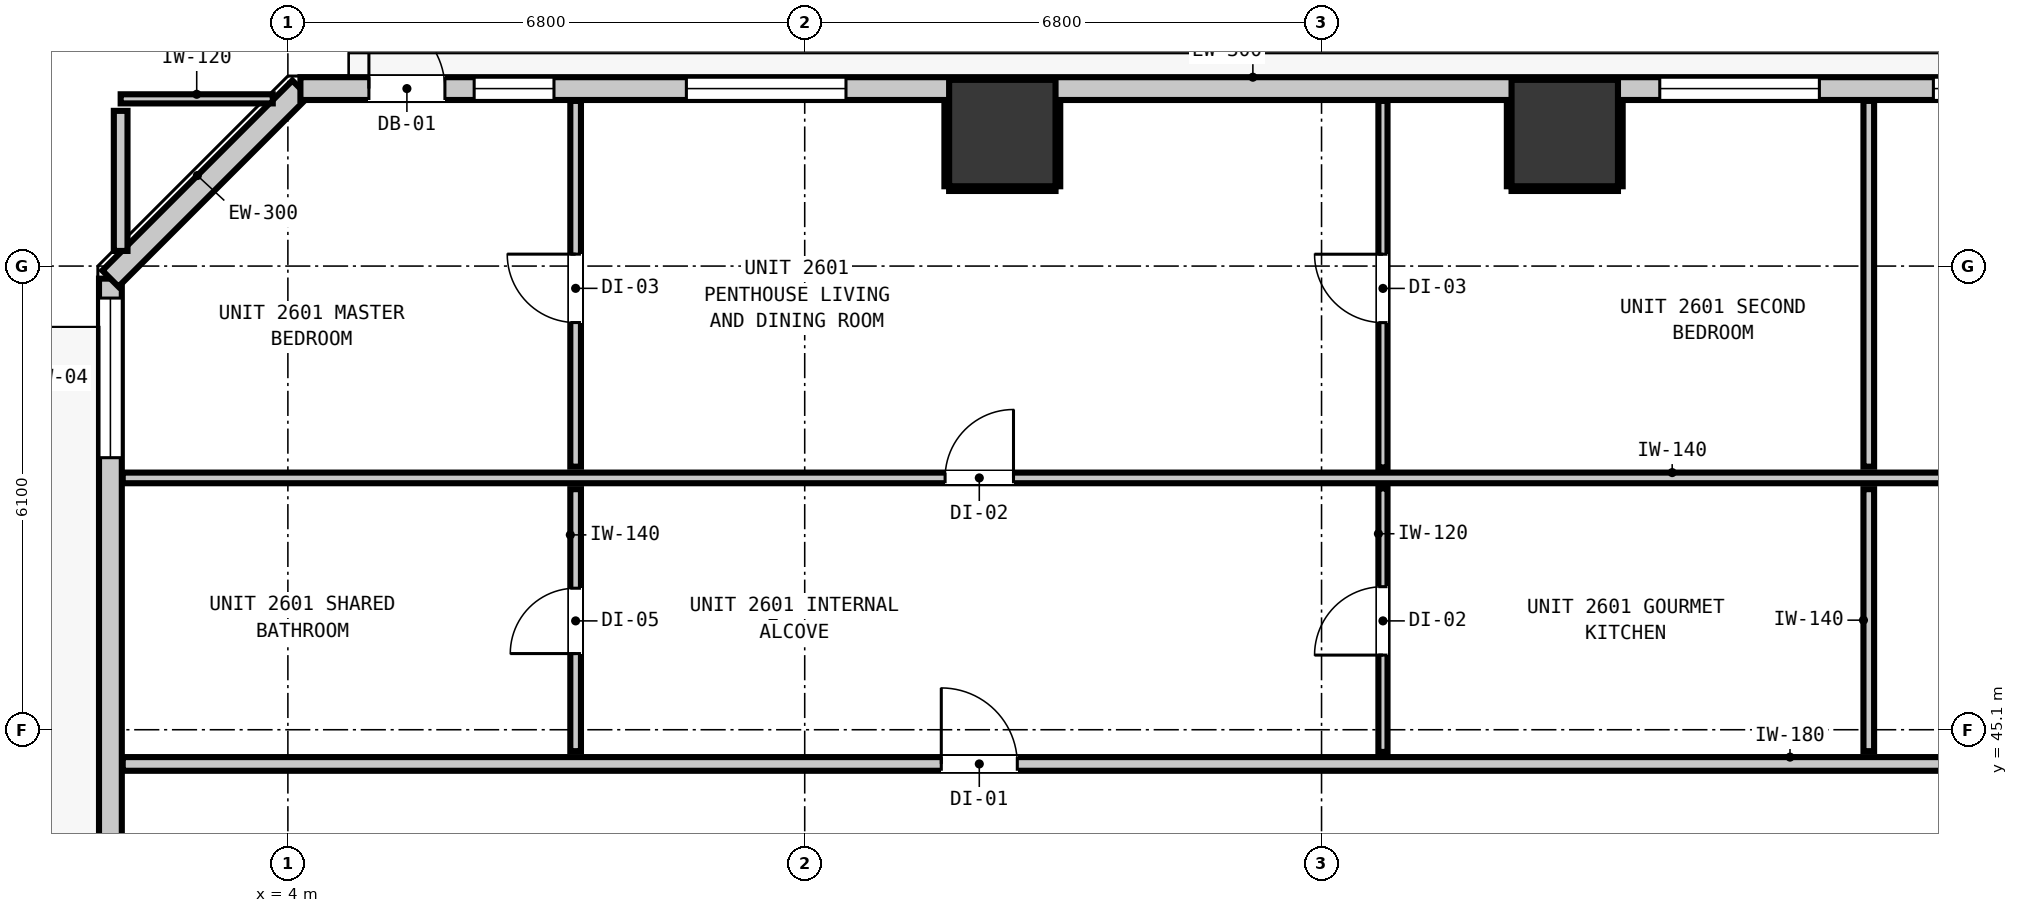
"""IFC4 building model, lengths in metres.
Left out: names, types, materials, properties, quantities, classifications, styles, units other than length and angle.
Written with IfcOpenShell. Run it as: python <this file> out.ifc"""

import sys

from ifc_helpers import new_model, si_unit, direction, frame, frame_2d, origin, origin_2d, place, context, subcontext, project, spatial, rectangle, extrude, element, fill, save


model = new_model("IFC4")
c1 = context("Model", 3, precision=1e-05, world=origin(), true_north=direction((0.0, 1.0)))
c2 = subcontext(c1, "Body", "Model", "MODEL_VIEW")
j1 = project(units=[si_unit("LENGTHUNIT", "METRE"), si_unit("PLANEANGLEUNIT", "RADIAN")], contexts=[c1])
p1 = place(None, origin())
s1 = spatial("IfcSite", under=j1, at=p1, CompositionType="ELEMENT")
p2 = place(p1, origin())
s2 = spatial("IfcBuilding", under=s1, at=p2, CompositionType="ELEMENT")
p3 = place(p2, frame((0.0, 0.0, 92.8)))
s3 = spatial("IfcBuildingStorey", under=s2, at=p3, CompositionType="ELEMENT", Elevation=92.8)
for number, where, z_axis, x_axis in (
    (1, (13.4, 52.95, 0.0), (0.0, 0.0, 1.0), (1.0, 0.0, 0.0)),
    (2, (20.8, 52.95, 0.0), (0.0, 0.0, 1.0), (1.0, 0.0, 0.0)),
):
    element("IfcColumn", number, at=place(p3, frame(where, z_axis=z_axis, x_axis=x_axis)), inside=s3, PredefinedType="COLUMN", context=c2, shape_type="SweptSolid", body=[
        extrude(rectangle(XDim=1.4, YDim=1.4, at=origin_2d()), origin(), (0.0, 0.0, 1.0), 3.32),
    ])
p4 = place(p3, frame((1.665, 16.365, 0.0), z_axis=(0.0, 0.0, 1.0), x_axis=(0.0, 1.0, 0.0)))
e3 = element("IfcWall", 3, at=p4, inside=s3, PredefinedType="STANDARD", context=c2, shape_type="SweptSolid", body=[
    extrude(rectangle(XDim=34.67, YDim=0.3, at=frame_2d((17.335, 0.0))), origin(), (0.0, 0.0, 1.0), 3.06),
])
p5 = place(p4, frame((0.901, 0.0, 0.0)))
e4 = element("IfcOpeningElement", 4, at=p5, cuts=e3, PredefinedType="OPENING", context=c2, shape_type="SweptSolid", body=[
    extrude(rectangle(XDim=1.0, YDim=2.15, at=frame_2d((0.5, 1.075))), frame((0.0, 0.16, 0.0), z_axis=(0.0, -1.0, 0.0), x_axis=(1.0, 0.0, 0.0)), (0.0, 0.0, 1.0), 0.32),
])
p6 = place(p4, frame((32.314, 0.0, 0.85)))
e5 = element("IfcOpeningElement", 5, at=p6, cuts=e3, PredefinedType="OPENING", context=c2, shape_type="SweptSolid", body=[
    extrude(rectangle(XDim=2.1, YDim=1.9, at=frame_2d((1.05, 0.95))), frame((0.0, 0.16, 0.0), z_axis=(0.0, -1.0, 0.0), x_axis=(1.0, 0.0, 0.0)), (0.0, 0.0, 1.0), 0.32),
])
p7 = place(p3, frame((1.665, 51.035, 0.0), z_axis=(0.0, 0.0, 1.0), x_axis=(0.707106781187, 0.707106781187, 0.0)))
e6 = element("IfcWall", 6, at=p7, inside=s3, PredefinedType="STANDARD", context=c2, shape_type="SweptSolid", body=[
    extrude(rectangle(XDim=3.536, YDim=0.3, at=frame_2d((1.768, 0.0))), origin(), (0.0, 0.0, 1.0), 3.06),
])
p8 = place(p3, frame((4.165, 53.535, 0.0), z_axis=(0.0, 0.0, 1.0), x_axis=(1.0, 0.0, 0.0)))
e7 = element("IfcWall", 7, at=p8, inside=s3, PredefinedType="STANDARD", context=c2, shape_type="SweptSolid", body=[
    extrude(rectangle(XDim=37.47, YDim=0.3, at=frame_2d((18.735, 0.0))), origin(), (0.0, 0.0, 1.0), 3.06),
])
p9 = place(p8, frame((0.901, 0.0, 0.0)))
e8 = element("IfcOpeningElement", 8, at=p9, cuts=e7, PredefinedType="OPENING", context=c2, shape_type="SweptSolid", body=[
    extrude(rectangle(XDim=1.0, YDim=2.15, at=frame_2d((0.5, 1.075))), frame((0.0, 0.16, 0.0), z_axis=(0.0, -1.0, 0.0), x_axis=(1.0, 0.0, 0.0)), (0.0, 0.0, 1.0), 0.32),
])
p10 = place(p8, frame((5.078, 0.0, 0.85)))
e9 = element("IfcOpeningElement", 9, at=p10, cuts=e7, PredefinedType="OPENING", context=c2, shape_type="SweptSolid", body=[
    extrude(rectangle(XDim=2.1, YDim=1.9, at=frame_2d((1.05, 0.95))), frame((0.0, 0.16, 0.0), z_axis=(0.0, -1.0, 0.0), x_axis=(1.0, 0.0, 0.0)), (0.0, 0.0, 1.0), 0.32),
])
p11 = place(p8, frame((2.286, 0.0, 0.85)))
e10 = element("IfcOpeningElement", 10, at=p11, cuts=e7, PredefinedType="OPENING", context=c2, shape_type="SweptSolid", body=[
    extrude(rectangle(XDim=1.05, YDim=1.65, at=frame_2d((0.525, 0.825))), frame((0.0, 0.16, 0.0), z_axis=(0.0, -1.0, 0.0), x_axis=(1.0, 0.0, 0.0)), (0.0, 0.0, 1.0), 0.32),
])
p12 = place(p8, frame((17.885, 0.0, 0.85)))
e11 = element("IfcOpeningElement", 11, at=p12, cuts=e7, PredefinedType="OPENING", context=c2, shape_type="SweptSolid", body=[
    extrude(rectangle(XDim=2.1, YDim=1.9, at=frame_2d((1.05, 0.95))), frame((0.0, 0.16, 0.0), z_axis=(0.0, -1.0, 0.0), x_axis=(1.0, 0.0, 0.0)), (0.0, 0.0, 1.0), 0.32),
])
p13 = place(p8, frame((28.125, 0.0, 0.85)))
e12 = element("IfcOpeningElement", 12, at=p13, cuts=e7, PredefinedType="OPENING", context=c2, shape_type="SweptSolid", body=[
    extrude(rectangle(XDim=2.1, YDim=1.9, at=frame_2d((1.05, 0.95))), frame((0.0, 0.16, 0.0), z_axis=(0.0, -1.0, 0.0), x_axis=(1.0, 0.0, 0.0)), (0.0, 0.0, 1.0), 0.32),
])
p14 = place(p8, frame((21.485, 0.0, 0.85)))
e13 = element("IfcOpeningElement", 13, at=p14, cuts=e7, PredefinedType="OPENING", context=c2, shape_type="SweptSolid", body=[
    extrude(rectangle(XDim=2.1, YDim=1.9, at=frame_2d((1.05, 0.95))), frame((0.0, 0.16, 0.0), z_axis=(0.0, -1.0, 0.0), x_axis=(1.0, 0.0, 0.0)), (0.0, 0.0, 1.0), 0.32),
])
p15 = place(p8, frame((34.648, 0.0, 0.85)))
e14 = element("IfcOpeningElement", 14, at=p15, cuts=e7, PredefinedType="OPENING", context=c2, shape_type="SweptSolid", body=[
    extrude(rectangle(XDim=2.1, YDim=1.9, at=frame_2d((1.05, 0.95))), frame((0.0, 0.16, 0.0), z_axis=(0.0, -1.0, 0.0), x_axis=(1.0, 0.0, 0.0)), (0.0, 0.0, 1.0), 0.32),
])
p16 = place(p3, frame((1.827, 44.65, 0.0), z_axis=(0.0, 0.0, 1.0), x_axis=(1.0, 0.0, 0.0)))
e15 = element("IfcWall", 15, at=p16, inside=s3, PredefinedType="PARTITIONING", context=c2, shape_type="SweptSolid", body=[
    extrude(rectangle(XDim=42.146, YDim=0.18, at=frame_2d((21.073, 0.0))), origin(), (0.0, 0.0, 1.0), 3.06),
])
p17 = place(p16, frame((10.77, 0.0, 0.0)))
e16 = element("IfcOpeningElement", 16, at=p17, cuts=e15, PredefinedType="OPENING", context=c2, shape_type="SweptSolid", body=[
    extrude(rectangle(XDim=1.0, YDim=2.15, at=frame_2d((0.5, 1.075))), frame((0.0, 0.1, 0.0), z_axis=(0.0, -1.0, 0.0), x_axis=(1.0, 0.0, 0.0)), (0.0, 0.0, 1.0), 0.2),
])
p18 = place(p16, frame((32.103, 0.0, 0.0)))
e17 = element("IfcOpeningElement", 17, at=p18, cuts=e15, PredefinedType="OPENING", context=c2, shape_type="SweptSolid", body=[
    extrude(rectangle(XDim=1.0, YDim=2.15, at=frame_2d((0.5, 1.075))), frame((0.0, 0.1, 0.0), z_axis=(0.0, -1.0, 0.0), x_axis=(1.0, 0.0, 0.0)), (0.0, 0.0, 1.0), 0.2),
])
p19 = place(p3, frame((1.827, 48.413, 0.0), z_axis=(0.0, 0.0, 1.0), x_axis=(1.0, 0.0, 0.0)))
e18 = element("IfcWall", 18, at=p19, inside=s3, PredefinedType="PARTITIONING", context=c2, shape_type="SweptSolid", body=[
    extrude(rectangle(XDim=28.953, YDim=0.14, at=frame_2d((14.477, 0.0))), origin(), (0.0, 0.0, 1.0), 3.06),
])
p20 = place(p19, frame((10.82, 0.0, 0.0)))
e19 = element("IfcOpeningElement", 19, at=p20, cuts=e18, PredefinedType="OPENING", context=c2, shape_type="SweptSolid", body=[
    extrude(rectangle(XDim=0.9, YDim=2.1, at=frame_2d((0.45, 1.05))), frame((0.0, 0.08, 0.0), z_axis=(0.0, -1.0, 0.0), x_axis=(1.0, 0.0, 0.0)), (0.0, 0.0, 1.0), 0.16),
])
p21 = place(p3, frame((1.8, 53.4, 0.0), z_axis=(0.0, 0.0, 1.0), x_axis=(1.0, 0.0, 0.0)))
e20 = element("IfcWall", 20, at=p21, inside=s3, PredefinedType="PARTITIONING", context=c2, shape_type="SweptSolid", body=[
    extrude(rectangle(XDim=2.001, YDim=0.12, at=frame_2d((1.0, 0.0))), origin(), (0.0, 0.0, 1.0), 3.06),
])
p22 = place(p3, frame((1.8, 51.399, 0.0), z_axis=(0.0, 0.0, 1.0), x_axis=(0.0, 1.0, 0.0)))
e21 = element("IfcWall", 21, at=p22, inside=s3, PredefinedType="PARTITIONING", context=c2, shape_type="SweptSolid", body=[
    extrude(rectangle(XDim=1.843, YDim=0.18, at=frame_2d((0.921, 0.0))), origin(), (0.0, 0.0, 1.0), 3.06),
])
p23 = place(p3, frame((7.786, 44.818, 0.0), z_axis=(0.0, 0.0, 1.0), x_axis=(0.0, 1.0, 0.0)))
e22 = element("IfcWall", 22, at=p23, inside=s3, PredefinedType="PARTITIONING", context=c2, shape_type="SweptSolid", body=[
    extrude(rectangle(XDim=3.447, YDim=0.14, at=frame_2d((1.723, 0.0))), origin(), (0.0, 0.0, 1.0), 3.06),
])
p24 = place(p23, frame((1.284, 0.0, 0.0)))
e23 = element("IfcOpeningElement", 23, at=p24, cuts=e22, PredefinedType="OPENING", context=c2, shape_type="SweptSolid", body=[
    extrude(rectangle(XDim=0.86, YDim=2.02, at=frame_2d((0.43, 1.01))), frame((0.0, 0.08, 0.0), z_axis=(0.0, -1.0, 0.0), x_axis=(1.0, 0.0, 0.0)), (0.0, 0.0, 1.0), 0.16),
])
p25 = place(p3, frame((7.786, 48.561, 0.0), z_axis=(0.0, 0.0, 1.0), x_axis=(0.0, 1.0, 0.0)))
e24 = element("IfcWall", 24, at=p25, inside=s3, PredefinedType="PARTITIONING", context=c2, shape_type="SweptSolid", body=[
    extrude(rectangle(XDim=4.812, YDim=0.14, at=frame_2d((2.406, 0.0))), origin(), (0.0, 0.0, 1.0), 3.06),
])
p26 = place(p25, frame((1.896, 0.0, 0.0)))
e25 = element("IfcOpeningElement", 25, at=p26, cuts=e24, PredefinedType="OPENING", context=c2, shape_type="SweptSolid", body=[
    extrude(rectangle(XDim=0.9, YDim=2.1, at=frame_2d((0.45, 1.05))), frame((0.0, 0.08, 0.0), z_axis=(0.0, -1.0, 0.0), x_axis=(1.0, 0.0, 0.0)), (0.0, 0.0, 1.0), 0.16),
])
p27 = place(p3, frame((24.8, 44.818, 0.0), z_axis=(0.0, 0.0, 1.0), x_axis=(0.0, 1.0, 0.0)))
e26 = element("IfcWall", 26, at=p27, inside=s3, PredefinedType="PARTITIONING", context=c2, shape_type="SweptSolid", body=[
    extrude(rectangle(XDim=3.447, YDim=0.14, at=frame_2d((1.723, 0.0))), origin(), (0.0, 0.0, 1.0), 3.06),
])
p28 = place(p3, frame((24.8, 48.561, 0.0), z_axis=(0.0, 0.0, 1.0), x_axis=(0.0, 1.0, 0.0)))
e27 = element("IfcWall", 27, at=p28, inside=s3, PredefinedType="PARTITIONING", context=c2, shape_type="SweptSolid", body=[
    extrude(rectangle(XDim=4.812, YDim=0.14, at=frame_2d((2.406, 0.0))), origin(), (0.0, 0.0, 1.0), 3.06),
])
p29 = place(p3, frame((18.408, 44.808, 0.0), z_axis=(0.0, 0.0, 1.0), x_axis=(0.0, 1.0, 0.0)))
e28 = element("IfcWall", 28, at=p29, inside=s3, PredefinedType="PARTITIONING", context=c2, shape_type="SweptSolid", body=[
    extrude(rectangle(XDim=3.467, YDim=0.12, at=frame_2d((1.733, 0.0))), origin(), (0.0, 0.0, 1.0), 3.06),
])
p30 = place(p29, frame((1.274, 0.0, 0.0)))
e29 = element("IfcOpeningElement", 29, at=p30, cuts=e28, PredefinedType="OPENING", context=c2, shape_type="SweptSolid", body=[
    extrude(rectangle(XDim=0.9, YDim=2.1, at=frame_2d((0.45, 1.05))), frame((0.0, 0.07, 0.0), z_axis=(0.0, -1.0, 0.0), x_axis=(1.0, 0.0, 0.0)), (0.0, 0.0, 1.0), 0.14),
])
p31 = place(p3, frame((18.408, 48.551, 0.0), z_axis=(0.0, 0.0, 1.0), x_axis=(0.0, 1.0, 0.0)))
e30 = element("IfcWall", 30, at=p31, inside=s3, PredefinedType="PARTITIONING", context=c2, shape_type="SweptSolid", body=[
    extrude(rectangle(XDim=4.822, YDim=0.12, at=frame_2d((2.411, 0.0))), origin(), (0.0, 0.0, 1.0), 3.06),
])
p32 = place(p31, frame((1.905, 0.0, 0.0)))
e31 = element("IfcOpeningElement", 31, at=p32, cuts=e30, PredefinedType="OPENING", context=c2, shape_type="SweptSolid", body=[
    extrude(rectangle(XDim=0.9, YDim=2.1, at=frame_2d((0.45, 1.05))), frame((0.0, 0.07, 0.0), z_axis=(0.0, -1.0, 0.0), x_axis=(1.0, 0.0, 0.0)), (0.0, 0.0, 1.0), 0.14),
])
p33 = place(p3, frame((12.7, 52.218, 0.0), z_axis=(0.0, 0.0, 1.0), x_axis=(1.0, 0.0, 0.0)))
e32 = element("IfcWall", 32, at=p33, inside=s3, PredefinedType="PARTITIONING", context=c2, shape_type="SweptSolid", body=[
    extrude(rectangle(XDim=1.4, YDim=0.06, at=frame_2d((0.7, 0.0))), origin(), (0.0, 0.0, 1.0), 1.45),
])
for number, where, z_axis, x_axis in (
    (33, (12.668, 52.25, 0.0), (0.0, 0.0, 1.0), (0.0, 1.0, 0.0)),
    (34, (14.132, 52.25, 0.0), (0.0, 0.0, 1.0), (0.0, 1.0, 0.0)),
):
    element("IfcWall", number, at=place(p3, frame(where, z_axis=z_axis, x_axis=x_axis)), inside=s3, PredefinedType="PARTITIONING", context=c2, shape_type="SweptSolid", body=[
        extrude(rectangle(XDim=1.12, YDim=0.06, at=frame_2d((0.56, 0.0))), origin(), (0.0, 0.0, 1.0), 1.45),
    ])
p34 = place(p3, frame((20.1, 52.218, 0.0), z_axis=(0.0, 0.0, 1.0), x_axis=(1.0, 0.0, 0.0)))
e35 = element("IfcWall", 35, at=p34, inside=s3, PredefinedType="PARTITIONING", context=c2, shape_type="SweptSolid", body=[
    extrude(rectangle(XDim=1.4, YDim=0.06, at=frame_2d((0.7, 0.0))), origin(), (0.0, 0.0, 1.0), 1.45),
])
for number, where, z_axis, x_axis in (
    (36, (20.068, 52.25, 0.0), (0.0, 0.0, 1.0), (0.0, 1.0, 0.0)),
    (37, (21.532, 52.25, 0.0), (0.0, 0.0, 1.0), (0.0, 1.0, 0.0)),
):
    element("IfcWall", number, at=place(p3, frame(where, z_axis=z_axis, x_axis=x_axis)), inside=s3, PredefinedType="PARTITIONING", context=c2, shape_type="SweptSolid", body=[
        extrude(rectangle(XDim=1.12, YDim=0.06, at=frame_2d((0.56, 0.0))), origin(), (0.0, 0.0, 1.0), 1.45),
    ])
p35 = place(p9, origin())
e38 = element("IfcDoor", 38, at=p35, inside=s3, OperationType="SINGLE_SWING_LEFT", PredefinedType="DOOR", context=c2, shape_type="SweptSolid", body=[
    extrude(rectangle(XDim=1.0, YDim=2.15, at=frame_2d((0.5, 1.075))), frame((0.0, 0.025, 0.0), z_axis=(0.0, -1.0, 0.0), x_axis=(1.0, 0.0, 0.0)), (0.0, 0.0, 1.0), 0.05),
])
fill(e8, e38)
p36 = place(p6, origin())
e39 = element("IfcWindow", 39, at=p36, inside=s3, PartitioningType="SINGLE_PANEL", PredefinedType="WINDOW", context=c2, shape_type="SweptSolid", body=[
    extrude(rectangle(XDim=2.1, YDim=1.9, at=frame_2d((1.05, 0.95))), frame((0.0, 0.03, 0.0), z_axis=(0.0, -1.0, 0.0), x_axis=(1.0, 0.0, 0.0)), (0.0, 0.0, 1.0), 0.06),
])
fill(e5, e39)
p37 = place(p10, origin())
e40 = element("IfcWindow", 40, at=p37, inside=s3, PartitioningType="SINGLE_PANEL", PredefinedType="WINDOW", context=c2, shape_type="SweptSolid", body=[
    extrude(rectangle(XDim=2.1, YDim=1.9, at=frame_2d((1.05, 0.95))), frame((0.0, 0.03, 0.0), z_axis=(0.0, -1.0, 0.0), x_axis=(1.0, 0.0, 0.0)), (0.0, 0.0, 1.0), 0.06),
])
fill(e9, e40)
p38 = place(p11, origin())
e41 = element("IfcWindow", 41, at=p38, inside=s3, PartitioningType="SINGLE_PANEL", PredefinedType="WINDOW", context=c2, shape_type="SweptSolid", body=[
    extrude(rectangle(XDim=1.05, YDim=1.65, at=frame_2d((0.525, 0.825))), frame((0.0, 0.03, 0.0), z_axis=(0.0, -1.0, 0.0), x_axis=(1.0, 0.0, 0.0)), (0.0, 0.0, 1.0), 0.06),
])
fill(e10, e41)
p39 = place(p12, origin())
e42 = element("IfcWindow", 42, at=p39, inside=s3, PartitioningType="SINGLE_PANEL", PredefinedType="WINDOW", context=c2, shape_type="SweptSolid", body=[
    extrude(rectangle(XDim=2.1, YDim=1.9, at=frame_2d((1.05, 0.95))), frame((0.0, 0.03, 0.0), z_axis=(0.0, -1.0, 0.0), x_axis=(1.0, 0.0, 0.0)), (0.0, 0.0, 1.0), 0.06),
])
fill(e11, e42)
p40 = place(p14, origin())
e43 = element("IfcWindow", 43, at=p40, inside=s3, PartitioningType="SINGLE_PANEL", PredefinedType="WINDOW", context=c2, shape_type="SweptSolid", body=[
    extrude(rectangle(XDim=2.1, YDim=1.9, at=frame_2d((1.05, 0.95))), frame((0.0, 0.03, 0.0), z_axis=(0.0, -1.0, 0.0), x_axis=(1.0, 0.0, 0.0)), (0.0, 0.0, 1.0), 0.06),
])
fill(e13, e43)
p41 = place(p17, origin())
e44 = element("IfcDoor", 44, at=p41, inside=s3, OperationType="SINGLE_SWING_LEFT", PredefinedType="DOOR", context=c2, shape_type="SweptSolid", body=[
    extrude(rectangle(XDim=1.0, YDim=2.15, at=frame_2d((0.5, 1.075))), frame((0.0, 0.025, 0.0), z_axis=(0.0, -1.0, 0.0), x_axis=(1.0, 0.0, 0.0)), (0.0, 0.0, 1.0), 0.05),
])
fill(e16, e44)
p42 = place(p20, origin())
e45 = element("IfcDoor", 45, at=p42, inside=s3, OperationType="SINGLE_SWING_RIGHT", PredefinedType="DOOR", context=c2, shape_type="SweptSolid", body=[
    extrude(rectangle(XDim=0.9, YDim=2.1, at=frame_2d((0.45, 1.05))), frame((0.0, 0.025, 0.0), z_axis=(0.0, -1.0, 0.0), x_axis=(1.0, 0.0, 0.0)), (0.0, 0.0, 1.0), 0.05),
])
fill(e19, e45)
p43 = place(p24, origin())
e46 = element("IfcDoor", 46, at=p43, inside=s3, OperationType="SINGLE_SWING_LEFT", PredefinedType="DOOR", context=c2, shape_type="SweptSolid", body=[
    extrude(rectangle(XDim=0.86, YDim=2.02, at=frame_2d((0.43, 1.01))), frame((0.0, 0.025, 0.0), z_axis=(0.0, -1.0, 0.0), x_axis=(1.0, 0.0, 0.0)), (0.0, 0.0, 1.0), 0.05),
])
fill(e23, e46)
p44 = place(p26, origin())
e47 = element("IfcDoor", 47, at=p44, inside=s3, OperationType="SINGLE_SWING_RIGHT", PredefinedType="DOOR", context=c2, shape_type="SweptSolid", body=[
    extrude(rectangle(XDim=0.9, YDim=2.1, at=frame_2d((0.45, 1.05))), frame((0.0, 0.025, 0.0), z_axis=(0.0, -1.0, 0.0), x_axis=(1.0, 0.0, 0.0)), (0.0, 0.0, 1.0), 0.05),
])
fill(e25, e47)
p45 = place(p30, origin())
e48 = element("IfcDoor", 48, at=p45, inside=s3, OperationType="SINGLE_SWING_LEFT", PredefinedType="DOOR", context=c2, shape_type="SweptSolid", body=[
    extrude(rectangle(XDim=0.9, YDim=2.1, at=frame_2d((0.45, 1.05))), frame((0.0, 0.025, 0.0), z_axis=(0.0, -1.0, 0.0), x_axis=(1.0, 0.0, 0.0)), (0.0, 0.0, 1.0), 0.05),
])
fill(e29, e48)
p46 = place(p32, origin())
e49 = element("IfcDoor", 49, at=p46, inside=s3, OperationType="SINGLE_SWING_RIGHT", PredefinedType="DOOR", context=c2, shape_type="SweptSolid", body=[
    extrude(rectangle(XDim=0.9, YDim=2.1, at=frame_2d((0.45, 1.05))), frame((0.0, 0.025, 0.0), z_axis=(0.0, -1.0, 0.0), x_axis=(1.0, 0.0, 0.0)), (0.0, 0.0, 1.0), 0.05),
])
fill(e31, e49)
save(model, sys.argv[1])
